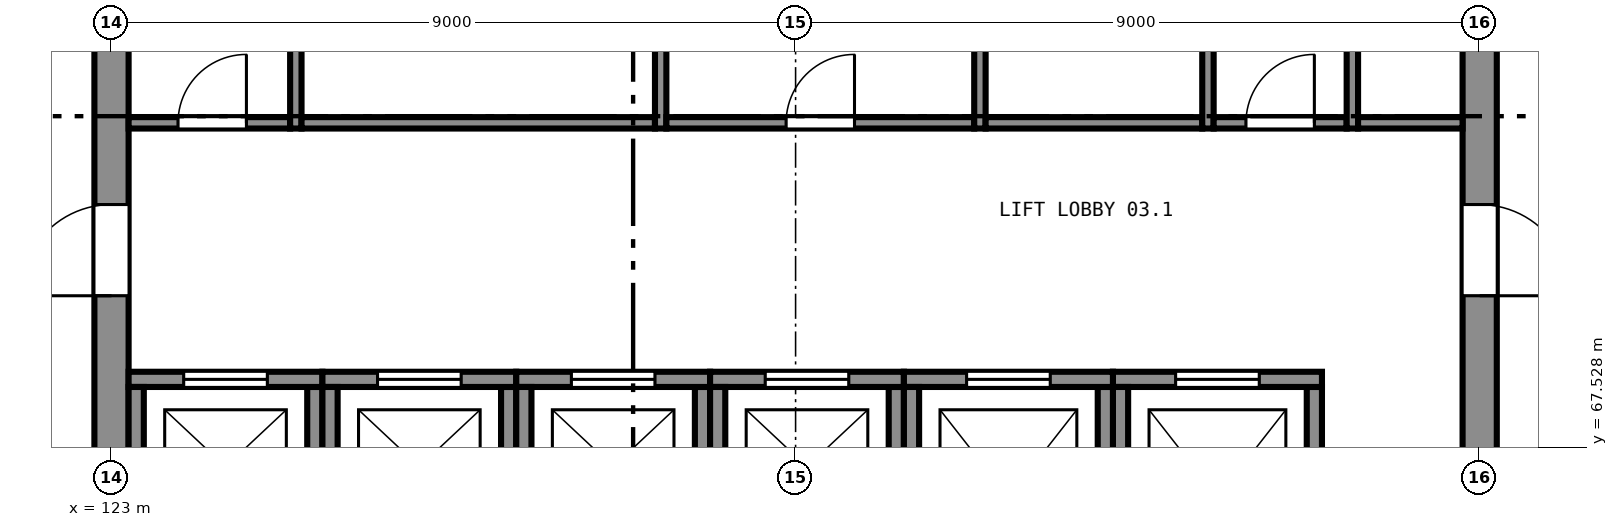
"""IFC4 building model, lengths in metres.
Left out: names, types, materials, properties, quantities, classifications, styles, units other than length and angle.
Written with IfcOpenShell. Run it as: python <this file> out.ifc"""

import sys

from ifc_helpers import new_model, si_unit, direction, frame, frame_2d, origin, place, context, subcontext, project, spatial, rectangle, extrude, element, fill, save


model = new_model("IFC4")
c1 = context("Model", 3, precision=1e-05, world=origin(), true_north=direction((0.0, 1.0)))
c2 = subcontext(c1, "Body", "Model", "MODEL_VIEW")
j1 = project(units=[si_unit("LENGTHUNIT", "METRE"), si_unit("PLANEANGLEUNIT", "RADIAN")], contexts=[c1])
p1 = place(None, origin())
s1 = spatial("IfcSite", under=j1, at=p1, CompositionType="ELEMENT")
p2 = place(p1, origin())
s2 = spatial("IfcBuilding", under=s1, at=p2, CompositionType="ELEMENT")
p3 = place(p2, frame((0.0, 0.0, 13.5)))
s3 = spatial("IfcBuildingStorey", under=s2, at=p3, CompositionType="ELEMENT", Elevation=13.5)
p4 = place(p3, frame((141.0, 65.225, 0.0), z_axis=(0.0, 0.0, 1.0), x_axis=(0.0, 1.0, 0.0)))
e1 = element("IfcWall", 1, at=p4, inside=s3, PredefinedType="SHEAR", context=c2, shape_type="SweptSolid", body=[
    extrude(rectangle(XDim=17.55, YDim=0.45, at=frame_2d((8.775, 0.0))), origin(), (0.0, 0.0, 1.0), 4.0),
])
p5 = place(p4, frame((4.3, 0.0, 0.0)))
e2 = element("IfcOpeningElement", 2, at=p5, cuts=e1, PredefinedType="OPENING", context=c2, shape_type="SweptSolid", body=[
    extrude(rectangle(XDim=1.2, YDim=2.1, at=frame_2d((0.6, 1.05))), frame((0.0, 0.235, 0.0), z_axis=(0.0, -1.0, 0.0), x_axis=(1.0, 0.0, 0.0)), (0.0, 0.0, 1.0), 0.47),
])
p6 = place(p4, frame((12.05, 0.0, 0.0)))
e3 = element("IfcOpeningElement", 3, at=p6, cuts=e1, PredefinedType="OPENING", context=c2, shape_type="SweptSolid", body=[
    extrude(rectangle(XDim=1.2, YDim=2.1, at=frame_2d((0.6, 1.05))), frame((0.0, 0.235, 0.0), z_axis=(0.0, -1.0, 0.0), x_axis=(1.0, 0.0, 0.0)), (0.0, 0.0, 1.0), 0.47),
])
p7 = place(p3, frame((123.0, 82.775, 0.0), z_axis=(0.0, 0.0, 1.0), x_axis=(0.0, -1.0, 0.0)))
e4 = element("IfcWall", 4, at=p7, inside=s3, PredefinedType="SHEAR", context=c2, shape_type="SweptSolid", body=[
    extrude(rectangle(XDim=17.55, YDim=0.45, at=frame_2d((8.775, 0.0))), origin(), (0.0, 0.0, 1.0), 4.0),
])
p8 = place(p7, frame((12.05, 0.0, 0.0)))
e5 = element("IfcOpeningElement", 5, at=p8, cuts=e4, PredefinedType="OPENING", context=c2, shape_type="SweptSolid", body=[
    extrude(rectangle(XDim=1.2, YDim=2.1, at=frame_2d((0.6, 1.05))), frame((0.0, 0.235, 0.0), z_axis=(0.0, -1.0, 0.0), x_axis=(1.0, 0.0, 0.0)), (0.0, 0.0, 1.0), 0.47),
])
p9 = place(p7, frame((4.3, 0.0, 0.0)))
e6 = element("IfcOpeningElement", 6, at=p9, cuts=e4, PredefinedType="OPENING", context=c2, shape_type="SweptSolid", body=[
    extrude(rectangle(XDim=1.2, YDim=2.1, at=frame_2d((0.6, 1.05))), frame((0.0, 0.235, 0.0), z_axis=(0.0, -1.0, 0.0), x_axis=(1.0, 0.0, 0.0)), (0.0, 0.0, 1.0), 0.47),
])
p10 = place(p3, frame((125.675, 66.225, 0.0), z_axis=(0.0, 0.0, 1.0), x_axis=(0.0, 1.0, 0.0)))
e7 = element("IfcWall", 7, at=p10, inside=s3, PredefinedType="SHEAR", context=c2, shape_type="SweptSolid", body=[
    extrude(rectangle(XDim=2.1, YDim=0.2, at=frame_2d((1.05, 0.0))), origin(), (0.0, 0.0, 1.0), 4.0),
])
p11 = place(p3, frame((125.775, 68.425, 0.0), z_axis=(0.0, 0.0, 1.0), x_axis=(-1.0, 0.0, 0.0)))
e8 = element("IfcWall", 8, at=p11, inside=s3, PredefinedType="SHEAR", context=c2, shape_type="SweptSolid", body=[
    extrude(rectangle(XDim=2.55, YDim=0.2, at=frame_2d((1.275, 0.0))), origin(), (0.0, 0.0, 1.0), 4.0),
])
p12 = place(p11, frame((0.725, 0.0, 0.0)))
e9 = element("IfcOpeningElement", 9, at=p12, cuts=e8, PredefinedType="OPENING", context=c2, shape_type="SweptSolid", body=[
    extrude(rectangle(XDim=1.1, YDim=2.1, at=frame_2d((0.55, 1.05))), frame((0.0, 0.11, 0.0), z_axis=(0.0, -1.0, 0.0), x_axis=(1.0, 0.0, 0.0)), (0.0, 0.0, 1.0), 0.22),
])
for number, where, z_axis, x_axis in (
    (10, (123.325, 68.325, 0.0), (0.0, 0.0, 1.0), (0.0, -1.0, 0.0)),
    (11, (128.225, 66.225, 0.0), (0.0, 0.0, 1.0), (0.0, 1.0, 0.0)),
):
    element("IfcWall", number, at=place(p3, frame(where, z_axis=z_axis, x_axis=x_axis)), inside=s3, PredefinedType="SHEAR", context=c2, shape_type="SweptSolid", body=[
        extrude(rectangle(XDim=2.1, YDim=0.2, at=frame_2d((1.05, 0.0))), origin(), (0.0, 0.0, 1.0), 4.0),
    ])
p13 = place(p3, frame((128.325, 68.425, 0.0), z_axis=(0.0, 0.0, 1.0), x_axis=(-1.0, 0.0, 0.0)))
e12 = element("IfcWall", 12, at=p13, inside=s3, PredefinedType="SHEAR", context=c2, shape_type="SweptSolid", body=[
    extrude(rectangle(XDim=2.55, YDim=0.2, at=frame_2d((1.275, 0.0))), origin(), (0.0, 0.0, 1.0), 4.0),
])
p14 = place(p13, frame((0.725, 0.0, 0.0)))
e13 = element("IfcOpeningElement", 13, at=p14, cuts=e12, PredefinedType="OPENING", context=c2, shape_type="SweptSolid", body=[
    extrude(rectangle(XDim=1.1, YDim=2.1, at=frame_2d((0.55, 1.05))), frame((0.0, 0.11, 0.0), z_axis=(0.0, -1.0, 0.0), x_axis=(1.0, 0.0, 0.0)), (0.0, 0.0, 1.0), 0.22),
])
for number, where, z_axis, x_axis in (
    (14, (125.875, 68.325, 0.0), (0.0, 0.0, 1.0), (0.0, -1.0, 0.0)),
    (15, (130.775, 66.225, 0.0), (0.0, 0.0, 1.0), (0.0, 1.0, 0.0)),
):
    element("IfcWall", number, at=place(p3, frame(where, z_axis=z_axis, x_axis=x_axis)), inside=s3, PredefinedType="SHEAR", context=c2, shape_type="SweptSolid", body=[
        extrude(rectangle(XDim=2.1, YDim=0.2, at=frame_2d((1.05, 0.0))), origin(), (0.0, 0.0, 1.0), 4.0),
    ])
p15 = place(p3, frame((130.875, 68.425, 0.0), z_axis=(0.0, 0.0, 1.0), x_axis=(-1.0, 0.0, 0.0)))
e16 = element("IfcWall", 16, at=p15, inside=s3, PredefinedType="SHEAR", context=c2, shape_type="SweptSolid", body=[
    extrude(rectangle(XDim=2.55, YDim=0.2, at=frame_2d((1.275, 0.0))), origin(), (0.0, 0.0, 1.0), 4.0),
])
p16 = place(p15, frame((0.725, 0.0, 0.0)))
e17 = element("IfcOpeningElement", 17, at=p16, cuts=e16, PredefinedType="OPENING", context=c2, shape_type="SweptSolid", body=[
    extrude(rectangle(XDim=1.1, YDim=2.1, at=frame_2d((0.55, 1.05))), frame((0.0, 0.11, 0.0), z_axis=(0.0, -1.0, 0.0), x_axis=(1.0, 0.0, 0.0)), (0.0, 0.0, 1.0), 0.22),
])
for number, where, z_axis, x_axis in (
    (18, (128.425, 68.325, 0.0), (0.0, 0.0, 1.0), (0.0, -1.0, 0.0)),
    (19, (133.325, 66.225, 0.0), (0.0, 0.0, 1.0), (0.0, 1.0, 0.0)),
):
    element("IfcWall", number, at=place(p3, frame(where, z_axis=z_axis, x_axis=x_axis)), inside=s3, PredefinedType="SHEAR", context=c2, shape_type="SweptSolid", body=[
        extrude(rectangle(XDim=2.1, YDim=0.2, at=frame_2d((1.05, 0.0))), origin(), (0.0, 0.0, 1.0), 4.0),
    ])
p17 = place(p3, frame((133.425, 68.425, 0.0), z_axis=(0.0, 0.0, 1.0), x_axis=(-1.0, 0.0, 0.0)))
e20 = element("IfcWall", 20, at=p17, inside=s3, PredefinedType="SHEAR", context=c2, shape_type="SweptSolid", body=[
    extrude(rectangle(XDim=2.55, YDim=0.2, at=frame_2d((1.275, 0.0))), origin(), (0.0, 0.0, 1.0), 4.0),
])
p18 = place(p17, frame((0.725, 0.0, 0.0)))
e21 = element("IfcOpeningElement", 21, at=p18, cuts=e20, PredefinedType="OPENING", context=c2, shape_type="SweptSolid", body=[
    extrude(rectangle(XDim=1.1, YDim=2.1, at=frame_2d((0.55, 1.05))), frame((0.0, 0.11, 0.0), z_axis=(0.0, -1.0, 0.0), x_axis=(1.0, 0.0, 0.0)), (0.0, 0.0, 1.0), 0.22),
])
p19 = place(p3, frame((130.975, 68.325, 0.0), z_axis=(0.0, 0.0, 1.0), x_axis=(0.0, -1.0, 0.0)))
e22 = element("IfcWall", 22, at=p19, inside=s3, PredefinedType="SHEAR", context=c2, shape_type="SweptSolid", body=[
    extrude(rectangle(XDim=2.1, YDim=0.2, at=frame_2d((1.05, 0.0))), origin(), (0.0, 0.0, 1.0), 4.0),
])
p20 = place(p3, frame((136.075, 65.425, 0.0), z_axis=(0.0, 0.0, 1.0), x_axis=(0.0, 1.0, 0.0)))
e23 = element("IfcWall", 23, at=p20, inside=s3, PredefinedType="SHEAR", context=c2, shape_type="SweptSolid", body=[
    extrude(rectangle(XDim=2.9, YDim=0.2, at=frame_2d((1.45, 0.0))), origin(), (0.0, 0.0, 1.0), 4.0),
])
p21 = place(p3, frame((136.175, 68.425, 0.0), z_axis=(0.0, 0.0, 1.0), x_axis=(-1.0, 0.0, 0.0)))
e24 = element("IfcWall", 24, at=p21, inside=s3, PredefinedType="SHEAR", context=c2, shape_type="SweptSolid", body=[
    extrude(rectangle(XDim=2.75, YDim=0.2, at=frame_2d((1.375, 0.0))), origin(), (0.0, 0.0, 1.0), 4.0),
])
p22 = place(p21, frame((0.825, 0.0, 0.0)))
e25 = element("IfcOpeningElement", 25, at=p22, cuts=e24, PredefinedType="OPENING", context=c2, shape_type="SweptSolid", body=[
    extrude(rectangle(XDim=1.1, YDim=2.1, at=frame_2d((0.55, 1.05))), frame((0.0, 0.11, 0.0), z_axis=(0.0, -1.0, 0.0), x_axis=(1.0, 0.0, 0.0)), (0.0, 0.0, 1.0), 0.22),
])
for number, where, z_axis, x_axis in (
    (26, (133.525, 68.325, 0.0), (0.0, 0.0, 1.0), (0.0, -1.0, 0.0)),
    (27, (138.825, 65.425, 0.0), (0.0, 0.0, 1.0), (0.0, 1.0, 0.0)),
):
    element("IfcWall", number, at=place(p3, frame(where, z_axis=z_axis, x_axis=x_axis)), inside=s3, PredefinedType="SHEAR", context=c2, shape_type="SweptSolid", body=[
        extrude(rectangle(XDim=2.9, YDim=0.2, at=frame_2d((1.45, 0.0))), origin(), (0.0, 0.0, 1.0), 4.0),
    ])
p23 = place(p3, frame((138.925, 68.425, 0.0), z_axis=(0.0, 0.0, 1.0), x_axis=(-1.0, 0.0, 0.0)))
e28 = element("IfcWall", 28, at=p23, inside=s3, PredefinedType="SHEAR", context=c2, shape_type="SweptSolid", body=[
    extrude(rectangle(XDim=2.75, YDim=0.2, at=frame_2d((1.375, 0.0))), origin(), (0.0, 0.0, 1.0), 4.0),
])
p24 = place(p23, frame((0.825, 0.0, 0.0)))
e29 = element("IfcOpeningElement", 29, at=p24, cuts=e28, PredefinedType="OPENING", context=c2, shape_type="SweptSolid", body=[
    extrude(rectangle(XDim=1.1, YDim=2.1, at=frame_2d((0.55, 1.05))), frame((0.0, 0.11, 0.0), z_axis=(0.0, -1.0, 0.0), x_axis=(1.0, 0.0, 0.0)), (0.0, 0.0, 1.0), 0.22),
])
p25 = place(p3, frame((136.275, 68.325, 0.0), z_axis=(0.0, 0.0, 1.0), x_axis=(0.0, -1.0, 0.0)))
e30 = element("IfcWall", 30, at=p25, inside=s3, PredefinedType="SHEAR", context=c2, shape_type="SweptSolid", body=[
    extrude(rectangle(XDim=2.9, YDim=0.2, at=frame_2d((1.45, 0.0))), origin(), (0.0, 0.0, 1.0), 4.0),
])
p26 = place(p3, frame((125.425, 71.725, 0.0), z_axis=(0.0, 0.0, 1.0), x_axis=(0.0, 1.0, 0.0)))
e31 = element("IfcWall", 31, at=p26, inside=s3, PredefinedType="PARTITIONING", context=c2, shape_type="SweptSolid", body=[
    extrude(rectangle(XDim=4.55, YDim=0.15, at=frame_2d((2.275, 0.0))), origin(), (0.0, 0.0, 1.0), 3.58),
])
p27 = place(p3, frame((123.225, 71.8, 0.0), z_axis=(0.0, 0.0, 1.0), x_axis=(1.0, 0.0, 0.0)))
e32 = element("IfcWall", 32, at=p27, inside=s3, PredefinedType="PARTITIONING", context=c2, shape_type="SweptSolid", body=[
    extrude(rectangle(XDim=2.125, YDim=0.15, at=frame_2d((1.062, 0.0))), origin(), (0.0, 0.0, 1.0), 3.58),
])
p28 = place(p27, frame((0.65, 0.0, 0.0)))
e33 = element("IfcOpeningElement", 33, at=p28, cuts=e32, PredefinedType="OPENING", context=c2, shape_type="SweptSolid", body=[
    extrude(rectangle(XDim=0.9, YDim=2.1, at=frame_2d((0.45, 1.05))), frame((0.0, 0.085, 0.0), z_axis=(0.0, -1.0, 0.0), x_axis=(1.0, 0.0, 0.0)), (0.0, 0.0, 1.0), 0.17),
])
p29 = place(p3, frame((130.225, 71.725, 0.0), z_axis=(0.0, 0.0, 1.0), x_axis=(0.0, 1.0, 0.0)))
e34 = element("IfcWall", 34, at=p29, inside=s3, PredefinedType="PARTITIONING", context=c2, shape_type="SweptSolid", body=[
    extrude(rectangle(XDim=4.55, YDim=0.15, at=frame_2d((2.275, 0.0))), origin(), (0.0, 0.0, 1.0), 3.58),
])
p30 = place(p3, frame((125.5, 71.8, 0.0), z_axis=(0.0, 0.0, 1.0), x_axis=(1.0, 0.0, 0.0)))
e35 = element("IfcWall", 35, at=p30, inside=s3, PredefinedType="PARTITIONING", context=c2, shape_type="SweptSolid", body=[
    extrude(rectangle(XDim=4.65, YDim=0.15, at=frame_2d((2.325, 0.0))), origin(), (0.0, 0.0, 1.0), 3.58),
])
p31 = place(p3, frame((134.425, 71.725, 0.0), z_axis=(0.0, 0.0, 1.0), x_axis=(0.0, 1.0, 0.0)))
e36 = element("IfcWall", 36, at=p31, inside=s3, PredefinedType="PARTITIONING", context=c2, shape_type="SweptSolid", body=[
    extrude(rectangle(XDim=4.55, YDim=0.15, at=frame_2d((2.275, 0.0))), origin(), (0.0, 0.0, 1.0), 3.58),
])
p32 = place(p3, frame((130.3, 71.8, 0.0), z_axis=(0.0, 0.0, 1.0), x_axis=(1.0, 0.0, 0.0)))
e37 = element("IfcWall", 37, at=p32, inside=s3, PredefinedType="PARTITIONING", context=c2, shape_type="SweptSolid", body=[
    extrude(rectangle(XDim=4.05, YDim=0.15, at=frame_2d((2.025, 0.0))), origin(), (0.0, 0.0, 1.0), 3.58),
])
p33 = place(p32, frame((1.575, 0.0, 0.0)))
e38 = element("IfcOpeningElement", 38, at=p33, cuts=e37, PredefinedType="OPENING", context=c2, shape_type="SweptSolid", body=[
    extrude(rectangle(XDim=0.9, YDim=2.1, at=frame_2d((0.45, 1.05))), frame((0.0, 0.085, 0.0), z_axis=(0.0, -1.0, 0.0), x_axis=(1.0, 0.0, 0.0)), (0.0, 0.0, 1.0), 0.17),
])
p34 = place(p3, frame((137.425, 71.725, 0.0), z_axis=(0.0, 0.0, 1.0), x_axis=(0.0, 1.0, 0.0)))
e39 = element("IfcWall", 39, at=p34, inside=s3, PredefinedType="PARTITIONING", context=c2, shape_type="SweptSolid", body=[
    extrude(rectangle(XDim=4.55, YDim=0.15, at=frame_2d((2.275, 0.0))), origin(), (0.0, 0.0, 1.0), 3.58),
])
p35 = place(p3, frame((134.5, 71.8, 0.0), z_axis=(0.0, 0.0, 1.0), x_axis=(1.0, 0.0, 0.0)))
e40 = element("IfcWall", 40, at=p35, inside=s3, PredefinedType="PARTITIONING", context=c2, shape_type="SweptSolid", body=[
    extrude(rectangle(XDim=2.85, YDim=0.15, at=frame_2d((1.425, 0.0))), origin(), (0.0, 0.0, 1.0), 3.58),
])
p36 = place(p3, frame((139.325, 71.725, 0.0), z_axis=(0.0, 0.0, 1.0), x_axis=(0.0, 1.0, 0.0)))
e41 = element("IfcWall", 41, at=p36, inside=s3, PredefinedType="PARTITIONING", context=c2, shape_type="SweptSolid", body=[
    extrude(rectangle(XDim=4.55, YDim=0.15, at=frame_2d((2.275, 0.0))), origin(), (0.0, 0.0, 1.0), 3.58),
])
p37 = place(p3, frame((137.5, 71.8, 0.0), z_axis=(0.0, 0.0, 1.0), x_axis=(1.0, 0.0, 0.0)))
e42 = element("IfcWall", 42, at=p37, inside=s3, PredefinedType="PARTITIONING", context=c2, shape_type="SweptSolid", body=[
    extrude(rectangle(XDim=1.75, YDim=0.15, at=frame_2d((0.875, 0.0))), origin(), (0.0, 0.0, 1.0), 3.58),
])
p38 = place(p37, frame((0.425, 0.0, 0.0)))
e43 = element("IfcOpeningElement", 43, at=p38, cuts=e42, PredefinedType="OPENING", context=c2, shape_type="SweptSolid", body=[
    extrude(rectangle(XDim=0.9, YDim=2.1, at=frame_2d((0.45, 1.05))), frame((0.0, 0.085, 0.0), z_axis=(0.0, -1.0, 0.0), x_axis=(1.0, 0.0, 0.0)), (0.0, 0.0, 1.0), 0.17),
])
p39 = place(p3, frame((139.4, 71.8, 0.0), z_axis=(0.0, 0.0, 1.0), x_axis=(1.0, 0.0, 0.0)))
e44 = element("IfcWall", 44, at=p39, inside=s3, PredefinedType="PARTITIONING", context=c2, shape_type="SweptSolid", body=[
    extrude(rectangle(XDim=1.375, YDim=0.15, at=frame_2d((0.688, 0.0))), origin(), (0.0, 0.0, 1.0), 3.58),
])
p40 = place(p12, origin())
e45 = element("IfcDoor", 45, at=p40, inside=s3, OperationType="SLIDING_TO_LEFT", PredefinedType="DOOR", context=c2, shape_type="SweptSolid", body=[
    extrude(rectangle(XDim=1.1, YDim=2.1, at=frame_2d((0.55, 1.05))), frame((0.0, 0.025, 0.0), z_axis=(0.0, -1.0, 0.0), x_axis=(1.0, 0.0, 0.0)), (0.0, 0.0, 1.0), 0.05),
])
fill(e9, e45)
p41 = place(p14, origin())
e46 = element("IfcDoor", 46, at=p41, inside=s3, OperationType="SLIDING_TO_LEFT", PredefinedType="DOOR", context=c2, shape_type="SweptSolid", body=[
    extrude(rectangle(XDim=1.1, YDim=2.1, at=frame_2d((0.55, 1.05))), frame((0.0, 0.025, 0.0), z_axis=(0.0, -1.0, 0.0), x_axis=(1.0, 0.0, 0.0)), (0.0, 0.0, 1.0), 0.05),
])
fill(e13, e46)
p42 = place(p16, origin())
e47 = element("IfcDoor", 47, at=p42, inside=s3, OperationType="SLIDING_TO_LEFT", PredefinedType="DOOR", context=c2, shape_type="SweptSolid", body=[
    extrude(rectangle(XDim=1.1, YDim=2.1, at=frame_2d((0.55, 1.05))), frame((0.0, 0.025, 0.0), z_axis=(0.0, -1.0, 0.0), x_axis=(1.0, 0.0, 0.0)), (0.0, 0.0, 1.0), 0.05),
])
fill(e17, e47)
p43 = place(p18, origin())
e48 = element("IfcDoor", 48, at=p43, inside=s3, OperationType="SLIDING_TO_LEFT", PredefinedType="DOOR", context=c2, shape_type="SweptSolid", body=[
    extrude(rectangle(XDim=1.1, YDim=2.1, at=frame_2d((0.55, 1.05))), frame((0.0, 0.025, 0.0), z_axis=(0.0, -1.0, 0.0), x_axis=(1.0, 0.0, 0.0)), (0.0, 0.0, 1.0), 0.05),
])
fill(e21, e48)
p44 = place(p22, origin())
e49 = element("IfcDoor", 49, at=p44, inside=s3, OperationType="SLIDING_TO_LEFT", PredefinedType="DOOR", context=c2, shape_type="SweptSolid", body=[
    extrude(rectangle(XDim=1.1, YDim=2.1, at=frame_2d((0.55, 1.05))), frame((0.0, 0.025, 0.0), z_axis=(0.0, -1.0, 0.0), x_axis=(1.0, 0.0, 0.0)), (0.0, 0.0, 1.0), 0.05),
])
fill(e25, e49)
p45 = place(p24, origin())
e50 = element("IfcDoor", 50, at=p45, inside=s3, OperationType="SLIDING_TO_LEFT", PredefinedType="DOOR", context=c2, shape_type="SweptSolid", body=[
    extrude(rectangle(XDim=1.1, YDim=2.1, at=frame_2d((0.55, 1.05))), frame((0.0, 0.025, 0.0), z_axis=(0.0, -1.0, 0.0), x_axis=(1.0, 0.0, 0.0)), (0.0, 0.0, 1.0), 0.05),
])
fill(e29, e50)
p46 = place(p8, frame((1.2, 0.0, 0.0), z_axis=(0.0, 0.0, 1.0), x_axis=(-1.0, 0.0, 0.0)))
e51 = element("IfcDoor", 51, at=p46, inside=s3, OperationType="SINGLE_SWING_RIGHT", PredefinedType="DOOR", context=c2, shape_type="SweptSolid", body=[
    extrude(rectangle(XDim=1.2, YDim=2.1, at=frame_2d((0.6, 1.05))), frame((0.0, 0.025, 0.0), z_axis=(0.0, -1.0, 0.0), x_axis=(1.0, 0.0, 0.0)), (0.0, 0.0, 1.0), 0.05),
])
fill(e5, e51)
p47 = place(p5, frame((1.2, 0.0, 0.0), z_axis=(0.0, 0.0, 1.0), x_axis=(-1.0, 0.0, 0.0)))
e52 = element("IfcDoor", 52, at=p47, inside=s3, OperationType="SINGLE_SWING_LEFT", PredefinedType="DOOR", context=c2, shape_type="SweptSolid", body=[
    extrude(rectangle(XDim=1.2, YDim=2.1, at=frame_2d((0.6, 1.05))), frame((0.0, 0.025, 0.0), z_axis=(0.0, -1.0, 0.0), x_axis=(1.0, 0.0, 0.0)), (0.0, 0.0, 1.0), 0.05),
])
fill(e2, e52)
p48 = place(p28, origin())
e53 = element("IfcDoor", 53, at=p48, inside=s3, OperationType="SINGLE_SWING_LEFT", PredefinedType="DOOR", context=c2, shape_type="SweptSolid", body=[
    extrude(rectangle(XDim=0.9, YDim=2.1, at=frame_2d((0.45, 1.05))), frame((0.0, 0.025, 0.0), z_axis=(0.0, -1.0, 0.0), x_axis=(1.0, 0.0, 0.0)), (0.0, 0.0, 1.0), 0.05),
])
fill(e33, e53)
p49 = place(p33, origin())
e54 = element("IfcDoor", 54, at=p49, inside=s3, OperationType="SINGLE_SWING_LEFT", PredefinedType="DOOR", context=c2, shape_type="SweptSolid", body=[
    extrude(rectangle(XDim=0.9, YDim=2.1, at=frame_2d((0.45, 1.05))), frame((0.0, 0.025, 0.0), z_axis=(0.0, -1.0, 0.0), x_axis=(1.0, 0.0, 0.0)), (0.0, 0.0, 1.0), 0.05),
])
fill(e38, e54)
p50 = place(p38, origin())
e55 = element("IfcDoor", 55, at=p50, inside=s3, OperationType="SINGLE_SWING_LEFT", PredefinedType="DOOR", context=c2, shape_type="SweptSolid", body=[
    extrude(rectangle(XDim=0.9, YDim=2.1, at=frame_2d((0.45, 1.05))), frame((0.0, 0.025, 0.0), z_axis=(0.0, -1.0, 0.0), x_axis=(1.0, 0.0, 0.0)), (0.0, 0.0, 1.0), 0.05),
])
fill(e43, e55)
save(model, sys.argv[1])
